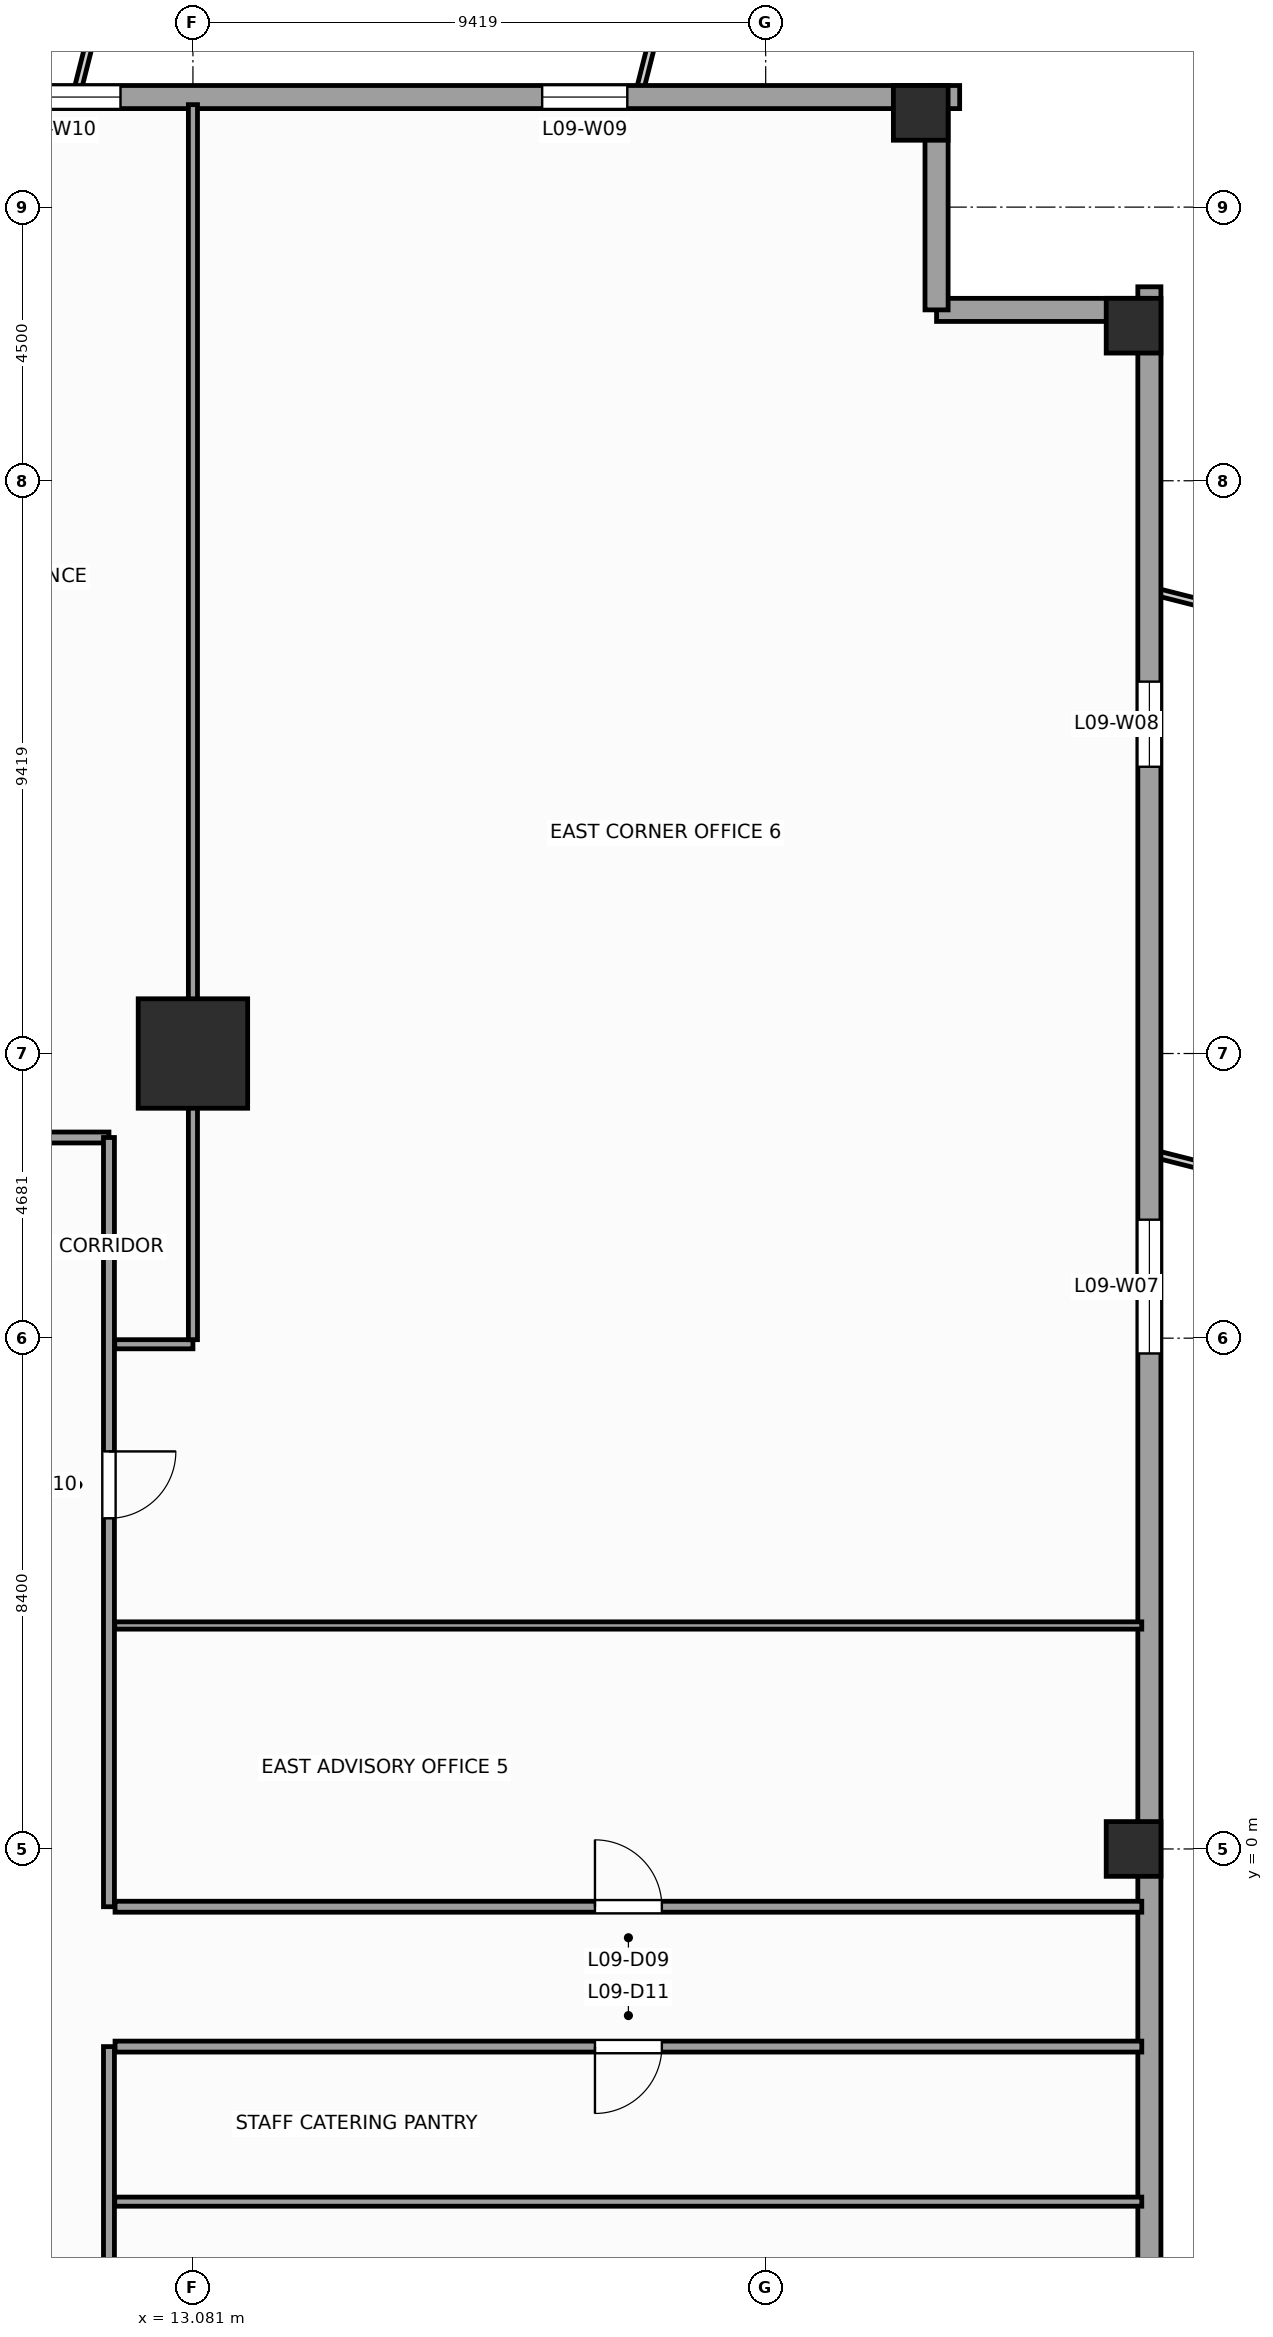
"""IFC4 building model, lengths in metres.
Left out: names, types, materials, properties, quantities, classifications, styles, units other than length and angle.
Written with IfcOpenShell. Run it as: python <this file> out.ifc"""

import sys

from ifc_helpers import new_model, si_unit, direction, frame, frame_2d, origin, origin_2d, place, context, subcontext, project, spatial, rectangle, extrude, source, transform, mapped, element, fill, save


model = new_model("IFC4")
c1 = context("Model", 3, precision=1e-05, world=origin(), true_north=direction((0.0, 1.0)))
c2 = subcontext(c1, "Body", "Model", "MODEL_VIEW")
j1 = project(units=[si_unit("LENGTHUNIT", "METRE"), si_unit("PLANEANGLEUNIT", "RADIAN")], contexts=[c1])
p1 = place(None, origin())
s1 = spatial("IfcSite", under=j1, at=p1, CompositionType="ELEMENT")
p2 = place(p1, origin())
s2 = spatial("IfcBuilding", under=s1, at=p2, CompositionType="ELEMENT")
p3 = place(p2, frame((0.0, 0.0, 42.0)))
s3 = spatial("IfcBuildingStorey", under=s2, at=p3, CompositionType="ELEMENT", Elevation=42.0)
m1 = source(origin(), c2, "Body", "SweptSolid", [
    extrude(rectangle(XDim=1.8, YDim=1.8, at=origin_2d()), origin(), (0.0, 0.0, 1.0), 4.0),
])
p4 = place(p3, frame((13.081, 13.081, 0.0), z_axis=(0.0, 0.0, 1.0), x_axis=(1.0, 0.0, 0.0)))
e1 = element("IfcColumn", 1, at=p4, inside=s3, PredefinedType="COLUMN", context=c2, shape_type="MappedRepresentation", body=[
    mapped(m1, transform((0.0, 0.0, 0.0), scale=1.0)),
])
m2 = source(origin(), c2, "Body", "SweptSolid", [
    extrude(rectangle(XDim=0.9, YDim=0.9, at=origin_2d()), origin(), (0.0, 0.0, 1.0), 4.0),
])
for number, where, z_axis, x_axis in (
    (2, (28.55, 0.0, 0.0), (0.0, 0.0, 1.0), (1.0, 0.0, 0.0)),
    (3, (28.55, 25.05, 0.0), (0.0, 0.0, 1.0), (1.0, 0.0, 0.0)),
    (4, (25.05, 28.55, 0.0), (0.0, 0.0, 1.0), (1.0, 0.0, 0.0)),
):
    element("IfcColumn", number, at=place(p3, frame(where, z_axis=z_axis, x_axis=x_axis)), inside=s3, PredefinedType="COLUMN", context=c2, shape_type="MappedRepresentation", body=[
        mapped(m2, transform((0.0, 0.0, 0.0), scale=1.0)),
    ])
p5 = place(p3, frame((28.81, -25.69, 0.0), z_axis=(0.0, 0.0, 1.0), x_axis=(0.0, 1.0, 0.0)))
e5 = element("IfcWall", 5, at=p5, inside=s3, PredefinedType="STANDARD", context=c2, shape_type="SweptSolid", body=[
    extrude(rectangle(XDim=51.38, YDim=0.38, at=frame_2d((25.69, 0.0))), origin(), (0.0, 0.0, 1.0), 3.12),
])
p6 = place(p5, frame((5.466, 0.0, 0.49)))
e6 = element("IfcOpeningElement", 6, at=p6, cuts=e5, PredefinedType="OPENING", context=c2, shape_type="SweptSolid", body=[
    extrude(rectangle(XDim=1.4, YDim=2.4, at=frame_2d((0.7, 1.2))), frame((0.0, 0.2, 0.0), z_axis=(0.0, -1.0, 0.0), x_axis=(1.0, 0.0, 0.0)), (0.0, 0.0, 1.0), 0.4),
])
p7 = place(p5, frame((13.8, 0.0, 0.49)))
e7 = element("IfcOpeningElement", 7, at=p7, cuts=e5, PredefinedType="OPENING", context=c2, shape_type="SweptSolid", body=[
    extrude(rectangle(XDim=2.2, YDim=2.4, at=frame_2d((1.1, 1.2))), frame((0.0, 0.2, 0.0), z_axis=(0.0, -1.0, 0.0), x_axis=(1.0, 0.0, 0.0)), (0.0, 0.0, 1.0), 0.4),
])
p8 = place(p5, frame((33.838, 0.0, 0.49)))
e8 = element("IfcOpeningElement", 8, at=p8, cuts=e5, PredefinedType="OPENING", context=c2, shape_type="SweptSolid", body=[
    extrude(rectangle(XDim=2.2, YDim=2.4, at=frame_2d((1.1, 1.2))), frame((0.0, 0.2, 0.0), z_axis=(0.0, -1.0, 0.0), x_axis=(1.0, 0.0, 0.0)), (0.0, 0.0, 1.0), 0.4),
])
p9 = place(p5, frame((43.487, 0.0, 0.49)))
e9 = element("IfcOpeningElement", 9, at=p9, cuts=e5, PredefinedType="OPENING", context=c2, shape_type="SweptSolid", body=[
    extrude(rectangle(XDim=1.4, YDim=2.4, at=frame_2d((0.7, 1.2))), frame((0.0, 0.2, 0.0), z_axis=(0.0, -1.0, 0.0), x_axis=(1.0, 0.0, 0.0)), (0.0, 0.0, 1.0), 0.4),
])
p10 = place(p3, frame((28.81, 25.31, 0.0), z_axis=(0.0, 0.0, 1.0), x_axis=(-1.0, 0.0, 0.0)))
e10 = element("IfcWall", 10, at=p10, inside=s3, PredefinedType="STANDARD", context=c2, shape_type="SweptSolid", body=[
    extrude(rectangle(XDim=3.5, YDim=0.38, at=frame_2d((1.75, 0.0))), origin(), (0.0, 0.0, 1.0), 3.72),
])
p11 = place(p3, frame((25.31, 25.31, 0.0), z_axis=(0.0, 0.0, 1.0), x_axis=(0.0, 1.0, 0.0)))
e11 = element("IfcWall", 11, at=p11, inside=s3, PredefinedType="STANDARD", context=c2, shape_type="SweptSolid", body=[
    extrude(rectangle(XDim=3.69, YDim=0.38, at=frame_2d((1.845, 0.0))), origin(), (0.0, 0.0, 1.0), 3.72),
])
p12 = place(p3, frame((25.69, 28.81, 0.0), z_axis=(0.0, 0.0, 1.0), x_axis=(-1.0, 0.0, 0.0)))
e12 = element("IfcWall", 12, at=p12, inside=s3, PredefinedType="STANDARD", context=c2, shape_type="SweptSolid", body=[
    extrude(rectangle(XDim=51.38, YDim=0.38, at=frame_2d((25.69, 0.0))), origin(), (0.0, 0.0, 1.0), 3.12),
])
p13 = place(p12, frame((20.415, 0.0, 0.0)))
e13 = element("IfcOpeningElement", 13, at=p13, cuts=e12, PredefinedType="OPENING", context=c2, shape_type="SweptSolid", body=[
    extrude(rectangle(XDim=1.05, YDim=2.25, at=frame_2d((0.525, 1.125))), frame((0.0, 0.2, 0.0), z_axis=(0.0, -1.0, 0.0), x_axis=(1.0, 0.0, 0.0)), (0.0, 0.0, 1.0), 0.4),
])
p14 = place(p12, frame((5.466, 0.0, 0.49)))
e14 = element("IfcOpeningElement", 14, at=p14, cuts=e12, PredefinedType="OPENING", context=c2, shape_type="SweptSolid", body=[
    extrude(rectangle(XDim=1.4, YDim=2.4, at=frame_2d((0.7, 1.2))), frame((0.0, 0.2, 0.0), z_axis=(0.0, -1.0, 0.0), x_axis=(1.0, 0.0, 0.0)), (0.0, 0.0, 1.0), 0.4),
])
p15 = place(p12, frame((13.8, 0.0, 0.49)))
e15 = element("IfcOpeningElement", 15, at=p15, cuts=e12, PredefinedType="OPENING", context=c2, shape_type="SweptSolid", body=[
    extrude(rectangle(XDim=2.2, YDim=2.4, at=frame_2d((1.1, 1.2))), frame((0.0, 0.2, 0.0), z_axis=(0.0, -1.0, 0.0), x_axis=(1.0, 0.0, 0.0)), (0.0, 0.0, 1.0), 0.4),
])
p16 = place(p12, frame((33.838, 0.0, 0.49)))
e16 = element("IfcOpeningElement", 16, at=p16, cuts=e12, PredefinedType="OPENING", context=c2, shape_type="SweptSolid", body=[
    extrude(rectangle(XDim=2.2, YDim=2.4, at=frame_2d((1.1, 1.2))), frame((0.0, 0.2, 0.0), z_axis=(0.0, -1.0, 0.0), x_axis=(1.0, 0.0, 0.0)), (0.0, 0.0, 1.0), 0.4),
])
p17 = place(p12, frame((43.487, 0.0, 0.49)))
e17 = element("IfcOpeningElement", 17, at=p17, cuts=e12, PredefinedType="OPENING", context=c2, shape_type="SweptSolid", body=[
    extrude(rectangle(XDim=1.4, YDim=2.4, at=frame_2d((0.7, 1.2))), frame((0.0, 0.2, 0.0), z_axis=(0.0, -1.0, 0.0), x_axis=(1.0, 0.0, 0.0)), (0.0, 0.0, 1.0), 0.4),
])
p18 = place(p3, frame((-10.6, 11.7, 0.0), z_axis=(0.0, 0.0, 1.0), x_axis=(1.0, 0.0, 0.0)))
e18 = element("IfcWall", 18, at=p18, inside=s3, PredefinedType="PARTITIONING", context=c2, shape_type="SweptSolid", body=[
    extrude(rectangle(XDim=22.3, YDim=0.18, at=frame_2d((11.15, 0.0))), origin(), (0.0, 0.0, 1.0), 3.72),
])
p19 = place(p18, frame((2.014, 0.0, 0.0)))
e19 = element("IfcOpeningElement", 19, at=p19, cuts=e18, PredefinedType="OPENING", context=c2, shape_type="SweptSolid", body=[
    extrude(rectangle(XDim=1.1, YDim=2.2, at=frame_2d((0.55, 1.1))), frame((0.0, 0.1, 0.0), z_axis=(0.0, -1.0, 0.0), x_axis=(1.0, 0.0, 0.0)), (0.0, 0.0, 1.0), 0.2),
])
p20 = place(p18, frame((7.4, 0.0, 0.0)))
e20 = element("IfcOpeningElement", 20, at=p20, cuts=e18, PredefinedType="OPENING", context=c2, shape_type="SweptSolid", body=[
    extrude(rectangle(XDim=1.1, YDim=2.2, at=frame_2d((0.55, 1.1))), frame((0.0, 0.1, 0.0), z_axis=(0.0, -1.0, 0.0), x_axis=(1.0, 0.0, 0.0)), (0.0, 0.0, 1.0), 0.2),
])
p21 = place(p18, frame((13.4, 0.0, 0.0)))
e21 = element("IfcOpeningElement", 21, at=p21, cuts=e18, PredefinedType="OPENING", context=c2, shape_type="SweptSolid", body=[
    extrude(rectangle(XDim=1.1, YDim=2.2, at=frame_2d((0.55, 1.1))), frame((0.0, 0.1, 0.0), z_axis=(0.0, -1.0, 0.0), x_axis=(1.0, 0.0, 0.0)), (0.0, 0.0, 1.0), 0.2),
])
p22 = place(p18, frame((18.835, 0.0, 0.0)))
e22 = element("IfcOpeningElement", 22, at=p22, cuts=e18, PredefinedType="OPENING", context=c2, shape_type="SweptSolid", body=[
    extrude(rectangle(XDim=1.1, YDim=2.2, at=frame_2d((0.55, 1.1))), frame((0.0, 0.1, 0.0), z_axis=(0.0, -1.0, 0.0), x_axis=(1.0, 0.0, 0.0)), (0.0, 0.0, 1.0), 0.2),
])
p23 = place(p3, frame((11.7, -10.6, 0.0), z_axis=(0.0, 0.0, 1.0), x_axis=(0.0, 1.0, 0.0)))
e23 = element("IfcWall", 23, at=p23, inside=s3, PredefinedType="PARTITIONING", context=c2, shape_type="SweptSolid", body=[
    extrude(rectangle(XDim=7.35, YDim=0.18, at=frame_2d((3.675, 0.0))), origin(), (0.0, 0.0, 1.0), 3.72),
])
p24 = place(p3, frame((11.7, -0.95, 0.0), z_axis=(0.0, 0.0, 1.0), x_axis=(0.0, 1.0, 0.0)))
e24 = element("IfcWall", 24, at=p24, inside=s3, PredefinedType="PARTITIONING", context=c2, shape_type="SweptSolid", body=[
    extrude(rectangle(XDim=12.65, YDim=0.18, at=frame_2d((6.325, 0.0))), origin(), (0.0, 0.0, 1.0), 3.72),
])
p25 = place(p24, frame((6.387, 0.0, 0.0)))
e25 = element("IfcOpeningElement", 25, at=p25, cuts=e24, PredefinedType="OPENING", context=c2, shape_type="SweptSolid", body=[
    extrude(rectangle(XDim=1.1, YDim=2.2, at=frame_2d((0.55, 1.1))), frame((0.0, 0.1, 0.0), z_axis=(0.0, -1.0, 0.0), x_axis=(1.0, 0.0, 0.0)), (0.0, 0.0, 1.0), 0.2),
])
p26 = place(p3, frame((11.8, -3.25, 0.0), z_axis=(0.0, 0.0, 1.0), x_axis=(1.0, 0.0, 0.0)))
e26 = element("IfcWall", 26, at=p26, inside=s3, PredefinedType="PARTITIONING", context=c2, shape_type="SweptSolid", body=[
    extrude(rectangle(XDim=16.885, YDim=0.18, at=frame_2d((8.442, 0.0))), origin(), (0.0, 0.0, 1.0), 3.72),
])
p27 = place(p26, frame((7.893, 0.0, 0.0)))
e27 = element("IfcOpeningElement", 27, at=p27, cuts=e26, PredefinedType="OPENING", context=c2, shape_type="SweptSolid", body=[
    extrude(rectangle(XDim=1.1, YDim=2.2, at=frame_2d((0.55, 1.1))), frame((0.0, 0.1, 0.0), z_axis=(0.0, -1.0, 0.0), x_axis=(1.0, 0.0, 0.0)), (0.0, 0.0, 1.0), 0.2),
])
p28 = place(p3, frame((11.8, -0.95, 0.0), z_axis=(0.0, 0.0, 1.0), x_axis=(1.0, 0.0, 0.0)))
e28 = element("IfcWall", 28, at=p28, inside=s3, PredefinedType="PARTITIONING", context=c2, shape_type="SweptSolid", body=[
    extrude(rectangle(XDim=16.885, YDim=0.18, at=frame_2d((8.442, 0.0))), origin(), (0.0, 0.0, 1.0), 3.72),
])
p29 = place(p28, frame((7.893, 0.0, 0.0)))
e29 = element("IfcOpeningElement", 29, at=p29, cuts=e28, PredefinedType="OPENING", context=c2, shape_type="SweptSolid", body=[
    extrude(rectangle(XDim=1.1, YDim=2.2, at=frame_2d((0.55, 1.1))), frame((0.0, 0.1, 0.0), z_axis=(0.0, -1.0, 0.0), x_axis=(1.0, 0.0, 0.0)), (0.0, 0.0, 1.0), 0.2),
])
p30 = place(p3, frame((11.795, 8.3, 0.0), z_axis=(0.0, 0.0, 1.0), x_axis=(1.0, 0.0, 0.0)))
e30 = element("IfcWall", 30, at=p30, inside=s3, PredefinedType="PARTITIONING", context=c2, shape_type="SweptSolid", body=[
    extrude(rectangle(XDim=1.286, YDim=0.15, at=frame_2d((0.643, 0.0))), origin(), (0.0, 0.0, 1.0), 3.72),
])
p31 = place(p3, frame((13.081, 8.375, 0.0), z_axis=(0.0, 0.0, 1.0), x_axis=(0.0, 1.0, 0.0)))
e31 = element("IfcWall", 31, at=p31, inside=s3, PredefinedType="PARTITIONING", context=c2, shape_type="SweptSolid", body=[
    extrude(rectangle(XDim=20.31, YDim=0.15, at=frame_2d((10.155, 0.0))), origin(), (0.0, 0.0, 1.0), 2.712),
])
p32 = place(p3, frame((11.795, 3.675, 0.0), z_axis=(0.0, 0.0, 1.0), x_axis=(1.0, 0.0, 0.0)))
e32 = element("IfcWall", 32, at=p32, inside=s3, PredefinedType="PARTITIONING", context=c2, shape_type="SweptSolid", body=[
    extrude(rectangle(XDim=16.89, YDim=0.12, at=frame_2d((8.445, 0.0))), origin(), (0.0, 0.0, 1.0), 3.72),
])
p33 = place(p3, frame((11.795, -5.8, 0.0), z_axis=(0.0, 0.0, 1.0), x_axis=(1.0, 0.0, 0.0)))
e33 = element("IfcWall", 33, at=p33, inside=s3, PredefinedType="PARTITIONING", context=c2, shape_type="SweptSolid", body=[
    extrude(rectangle(XDim=16.89, YDim=0.15, at=frame_2d((8.445, 0.0))), origin(), (0.0, 0.0, 1.0), 3.72),
])
m3 = source(origin(), c2, "Body", "SweptSolid", [
    extrude(rectangle(XDim=2.2, YDim=2.4, at=frame_2d((1.1, 1.2))), frame((0.0, 0.03, 0.0), z_axis=(0.0, -1.0, 0.0), x_axis=(1.0, 0.0, 0.0)), (0.0, 0.0, 1.0), 0.06),
])
p34 = place(p8, origin())
e34 = element("IfcWindow", 34, at=p34, inside=s3, PartitioningType="SINGLE_PANEL", PredefinedType="WINDOW", context=c2, shape_type="MappedRepresentation", body=[
    mapped(m3, transform((0.0, 0.0, 0.0), scale=1.0)),
])
fill(e8, e34)
m4 = source(origin(), c2, "Body", "SweptSolid", [
    extrude(rectangle(XDim=1.4, YDim=2.4, at=frame_2d((0.7, 1.2))), frame((0.0, 0.03, 0.0), z_axis=(0.0, -1.0, 0.0), x_axis=(1.0, 0.0, 0.0)), (0.0, 0.0, 1.0), 0.06),
])
p35 = place(p9, origin())
e35 = element("IfcWindow", 35, at=p35, inside=s3, PartitioningType="SINGLE_PANEL", PredefinedType="WINDOW", context=c2, shape_type="MappedRepresentation", body=[
    mapped(m4, transform((0.0, 0.0, 0.0), scale=1.0)),
])
fill(e9, e35)
p36 = place(p14, origin())
e36 = element("IfcWindow", 36, at=p36, inside=s3, PartitioningType="SINGLE_PANEL", PredefinedType="WINDOW", context=c2, shape_type="MappedRepresentation", body=[
    mapped(m4, transform((0.0, 0.0, 0.0), scale=1.0)),
])
fill(e14, e36)
p37 = place(p15, origin())
e37 = element("IfcWindow", 37, at=p37, inside=s3, PartitioningType="SINGLE_PANEL", PredefinedType="WINDOW", context=c2, shape_type="MappedRepresentation", body=[
    mapped(m3, transform((0.0, 0.0, 0.0), scale=1.0)),
])
fill(e15, e37)
m5 = source(origin(), c2, "Body", "SweptSolid", [
    extrude(rectangle(XDim=1.1, YDim=2.2, at=frame_2d((0.55, 1.1))), frame((0.0, 0.025, 0.0), z_axis=(0.0, -1.0, 0.0), x_axis=(1.0, 0.0, 0.0)), (0.0, 0.0, 1.0), 0.05),
])
p38 = place(p29, origin())
e38 = element("IfcDoor", 38, at=p38, inside=s3, OperationType="SINGLE_SWING_LEFT", PredefinedType="DOOR", context=c2, shape_type="MappedRepresentation", body=[
    mapped(m5, transform((0.0, 0.0, 0.0), scale=1.0)),
])
fill(e29, e38)
p39 = place(p25, frame((1.1, 0.0, 0.0), z_axis=(0.0, 0.0, 1.0), x_axis=(-1.0, 0.0, 0.0)))
e39 = element("IfcDoor", 39, at=p39, inside=s3, OperationType="SINGLE_SWING_RIGHT", PredefinedType="DOOR", context=c2, shape_type="MappedRepresentation", body=[
    mapped(m5, transform((0.0, 0.0, 0.0), scale=1.0)),
])
fill(e25, e39)
p40 = place(p27, frame((1.1, 0.0, 0.0), z_axis=(0.0, 0.0, 1.0), x_axis=(-1.0, 0.0, 0.0)))
e40 = element("IfcDoor", 40, at=p40, inside=s3, OperationType="SINGLE_SWING_LEFT", PredefinedType="DOOR", context=c2, shape_type="MappedRepresentation", body=[
    mapped(m5, transform((0.0, 0.0, 0.0), scale=1.0)),
])
fill(e27, e40)
save(model, sys.argv[1])
